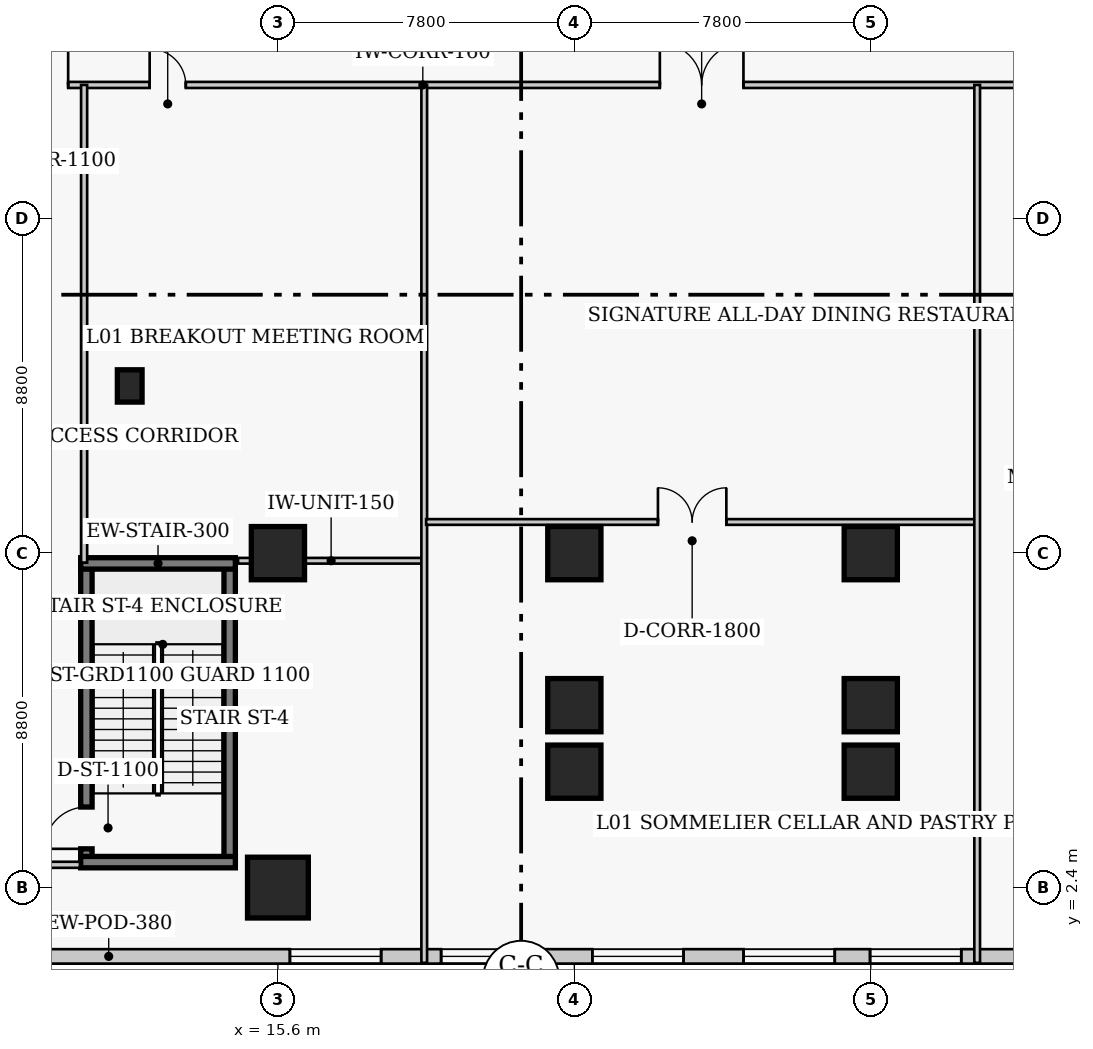
"""IFC4 building model, lengths in metres.
Left out: names, types, materials, properties, quantities, classifications, styles, units other than length and angle.
Written with IfcOpenShell. Run it as: python <this file> out.ifc"""

import sys

from ifc_helpers import new_model, si_unit, direction, frame, frame_2d, origin, origin_2d, place, context, subcontext, project, spatial, rectangle, extrude, element, fill, save


model = new_model("IFC4")
c1 = context("Model", 3, precision=1e-05, world=origin(), true_north=direction((0.0, 1.0)))
c2 = subcontext(c1, "Body", "Model", "MODEL_VIEW")
j1 = project(units=[si_unit("LENGTHUNIT", "METRE"), si_unit("PLANEANGLEUNIT", "RADIAN")], contexts=[c1])
p1 = place(None, origin())
s1 = spatial("IfcSite", under=j1, at=p1, CompositionType="ELEMENT")
p2 = place(p1, origin())
s2 = spatial("IfcBuilding", under=s1, at=p2, CompositionType="ELEMENT")
p3 = place(p2, frame((0.0, 0.0, 5.4)))
s3 = spatial("IfcBuildingStorey", under=s2, at=p3, CompositionType="ELEMENT", Elevation=5.4)
p4 = place(p3, frame((10.56, 3.07, 0.0), z_axis=(0.0, 0.0, 1.0), x_axis=(0.0, 1.0, 0.0)))
e1 = element("IfcWall", 1, at=p4, inside=s3, PredefinedType="SHEAR", context=c2, shape_type="SweptSolid", body=[
    extrude(rectangle(XDim=7.86, YDim=0.3, at=frame_2d((3.93, 0.0))), origin(), (0.0, 0.0, 1.0), 5.0),
])
p5 = place(p4, frame((0.35, 0.0, 0.0)))
e2 = element("IfcOpeningElement", 2, at=p5, cuts=e1, PredefinedType="OPENING", context=c2, shape_type="SweptSolid", body=[
    extrude(rectangle(XDim=1.1, YDim=2.15, at=frame_2d((0.55, 1.075))), frame((0.0, 0.16, 0.0), z_axis=(0.0, -1.0, 0.0), x_axis=(1.0, 0.0, 0.0)), (0.0, 0.0, 1.0), 0.32),
])
p6 = place(p3, frame((14.33, 3.07, 0.0), z_axis=(0.0, 0.0, 1.0), x_axis=(0.0, 1.0, 0.0)))
e3 = element("IfcWall", 3, at=p6, inside=s3, PredefinedType="SHEAR", context=c2, shape_type="SweptSolid", body=[
    extrude(rectangle(XDim=7.86, YDim=0.3, at=frame_2d((3.93, 0.0))), origin(), (0.0, 0.0, 1.0), 5.0),
])
for number, where, z_axis, x_axis in (
    (4, (10.41, 10.93, 0.0), (0.0, 0.0, 1.0), (1.0, 0.0, 0.0)),
    (5, (10.41, 3.07, 0.0), (0.0, 0.0, 1.0), (1.0, 0.0, 0.0)),
):
    element("IfcWall", number, at=place(p3, frame(where, z_axis=z_axis, x_axis=x_axis)), inside=s3, PredefinedType="SHEAR", context=c2, shape_type="SweptSolid", body=[
        extrude(rectangle(XDim=4.07, YDim=0.3, at=frame_2d((2.035, 0.0))), origin(), (0.0, 0.0, 1.0), 5.0),
    ])
p7 = place(p3, frame((15.6, 2.4, 0.0), z_axis=(0.0, 0.0, 1.0), x_axis=(1.0, 0.0, 0.0)))
e6 = element("IfcColumn", 6, at=p7, inside=s3, PredefinedType="COLUMN", context=c2, shape_type="SweptSolid", body=[
    extrude(rectangle(XDim=1.6, YDim=1.6, at=origin_2d()), origin(), (0.0, 0.0, 1.0), 5.0),
])
for number, where, z_axis, x_axis in (
    (7, (15.6, 11.2, 0.0), (0.0, 0.0, 1.0), (1.0, 0.0, 0.0)),
    (8, (23.4, 11.2, 0.0), (0.0, 0.0, 1.0), (1.0, 0.0, 0.0)),
    (9, (31.2, 11.2, 0.0), (0.0, 0.0, 1.0), (1.0, 0.0, 0.0)),
    (10, (23.4, 7.2, 0.0), (0.0, 0.0, 1.0), (1.0, 0.0, 0.0)),
    (11, (31.2, 7.2, 0.0), (0.0, 0.0, 1.0), (1.0, 0.0, 0.0)),
    (12, (23.4, 5.45, 0.0), (0.0, 0.0, 1.0), (1.0, 0.0, 0.0)),
    (13, (31.2, 5.45, 0.0), (0.0, 0.0, 1.0), (1.0, 0.0, 0.0)),
):
    element("IfcColumn", number, at=place(p3, frame(where, z_axis=z_axis, x_axis=x_axis)), inside=s3, PredefinedType="COLUMN", context=c2, shape_type="SweptSolid", body=[
        extrude(rectangle(XDim=1.4, YDim=1.4, at=origin_2d()), origin(), (0.0, 0.0, 1.0), 5.0),
    ])
p8 = place(p3, frame((11.7, 15.6, 0.0), z_axis=(0.0, 0.0, 1.0), x_axis=(1.0, 0.0, 0.0)))
e14 = element("IfcColumn", 14, at=p8, inside=s3, PredefinedType="PILASTER", context=c2, shape_type="SweptSolid", body=[
    extrude(rectangle(XDim=0.65, YDim=0.85, at=origin_2d()), origin(), (0.0, 0.0, 1.0), 5.0),
])
p9 = place(p3, frame((-0.79, 0.59, 0.0), z_axis=(0.0, 0.0, 1.0), x_axis=(1.0, 0.0, 0.0)))
e15 = element("IfcWall", 15, at=p9, inside=s3, PredefinedType="SOLIDWALL", context=c2, shape_type="SweptSolid", body=[
    extrude(rectangle(XDim=79.58, YDim=0.38, at=frame_2d((39.79, 0.0))), origin(), (0.0, 0.0, 1.0), 4.65),
])
p10 = place(p9, frame((1.439, 0.0, 0.75)))
e16 = element("IfcOpeningElement", 16, at=p10, cuts=e15, PredefinedType="OPENING", context=c2, shape_type="SweptSolid", body=[
    extrude(rectangle(XDim=2.4, YDim=2.2, at=frame_2d((1.2, 1.1))), frame((0.0, 0.2, 0.0), z_axis=(0.0, -1.0, 0.0), x_axis=(1.0, 0.0, 0.0)), (0.0, 0.0, 1.0), 0.4),
])
p11 = place(p9, frame((4.769, 0.0, 0.75)))
e17 = element("IfcOpeningElement", 17, at=p11, cuts=e15, PredefinedType="OPENING", context=c2, shape_type="SweptSolid", body=[
    extrude(rectangle(XDim=2.4, YDim=2.2, at=frame_2d((1.2, 1.1))), frame((0.0, 0.2, 0.0), z_axis=(0.0, -1.0, 0.0), x_axis=(1.0, 0.0, 0.0)), (0.0, 0.0, 1.0), 0.4),
])
p12 = place(p9, frame((16.706, 0.0, 0.75)))
e18 = element("IfcOpeningElement", 18, at=p12, cuts=e15, PredefinedType="OPENING", context=c2, shape_type="SweptSolid", body=[
    extrude(rectangle(XDim=2.4, YDim=2.2, at=frame_2d((1.2, 1.1))), frame((0.0, 0.2, 0.0), z_axis=(0.0, -1.0, 0.0), x_axis=(1.0, 0.0, 0.0)), (0.0, 0.0, 1.0), 0.4),
])
p13 = place(p9, frame((20.685, 0.0, 0.75)))
e19 = element("IfcOpeningElement", 19, at=p13, cuts=e15, PredefinedType="OPENING", context=c2, shape_type="SweptSolid", body=[
    extrude(rectangle(XDim=2.4, YDim=2.2, at=frame_2d((1.2, 1.1))), frame((0.0, 0.2, 0.0), z_axis=(0.0, -1.0, 0.0), x_axis=(1.0, 0.0, 0.0)), (0.0, 0.0, 1.0), 0.4),
])
p14 = place(p9, frame((24.664, 0.0, 0.75)))
e20 = element("IfcOpeningElement", 20, at=p14, cuts=e15, PredefinedType="OPENING", context=c2, shape_type="SweptSolid", body=[
    extrude(rectangle(XDim=2.4, YDim=2.2, at=frame_2d((1.2, 1.1))), frame((0.0, 0.2, 0.0), z_axis=(0.0, -1.0, 0.0), x_axis=(1.0, 0.0, 0.0)), (0.0, 0.0, 1.0), 0.4),
])
p15 = place(p9, frame((28.643, 0.0, 0.75)))
e21 = element("IfcOpeningElement", 21, at=p15, cuts=e15, PredefinedType="OPENING", context=c2, shape_type="SweptSolid", body=[
    extrude(rectangle(XDim=2.4, YDim=2.2, at=frame_2d((1.2, 1.1))), frame((0.0, 0.2, 0.0), z_axis=(0.0, -1.0, 0.0), x_axis=(1.0, 0.0, 0.0)), (0.0, 0.0, 1.0), 0.4),
])
p16 = place(p9, frame((31.971, 0.0, 0.75)))
e22 = element("IfcOpeningElement", 22, at=p16, cuts=e15, PredefinedType="OPENING", context=c2, shape_type="SweptSolid", body=[
    extrude(rectangle(XDim=2.4, YDim=2.2, at=frame_2d((1.2, 1.1))), frame((0.0, 0.2, 0.0), z_axis=(0.0, -1.0, 0.0), x_axis=(1.0, 0.0, 0.0)), (0.0, 0.0, 1.0), 0.4),
])
p17 = place(p9, frame((37.75, 0.0, 0.75)))
e23 = element("IfcOpeningElement", 23, at=p17, cuts=e15, PredefinedType="OPENING", context=c2, shape_type="SweptSolid", body=[
    extrude(rectangle(XDim=2.4, YDim=2.2, at=frame_2d((1.2, 1.1))), frame((0.0, 0.2, 0.0), z_axis=(0.0, -1.0, 0.0), x_axis=(1.0, 0.0, 0.0)), (0.0, 0.0, 1.0), 0.4),
])
p18 = place(p9, frame((44.559, 0.0, 0.75)))
e24 = element("IfcOpeningElement", 24, at=p18, cuts=e15, PredefinedType="OPENING", context=c2, shape_type="SweptSolid", body=[
    extrude(rectangle(XDim=2.4, YDim=2.2, at=frame_2d((1.2, 1.1))), frame((0.0, 0.2, 0.0), z_axis=(0.0, -1.0, 0.0), x_axis=(1.0, 0.0, 0.0)), (0.0, 0.0, 1.0), 0.4),
])
p19 = place(p9, frame((49.188, 0.0, 0.75)))
e25 = element("IfcOpeningElement", 25, at=p19, cuts=e15, PredefinedType="OPENING", context=c2, shape_type="SweptSolid", body=[
    extrude(rectangle(XDim=2.4, YDim=2.2, at=frame_2d((1.2, 1.1))), frame((0.0, 0.2, 0.0), z_axis=(0.0, -1.0, 0.0), x_axis=(1.0, 0.0, 0.0)), (0.0, 0.0, 1.0), 0.4),
])
p20 = place(p9, frame((52.517, 0.0, 0.75)))
e26 = element("IfcOpeningElement", 26, at=p20, cuts=e15, PredefinedType="OPENING", context=c2, shape_type="SweptSolid", body=[
    extrude(rectangle(XDim=2.4, YDim=2.2, at=frame_2d((1.2, 1.1))), frame((0.0, 0.2, 0.0), z_axis=(0.0, -1.0, 0.0), x_axis=(1.0, 0.0, 0.0)), (0.0, 0.0, 1.0), 0.4),
])
p21 = place(p9, frame((56.496, 0.0, 0.75)))
e27 = element("IfcOpeningElement", 27, at=p21, cuts=e15, PredefinedType="OPENING", context=c2, shape_type="SweptSolid", body=[
    extrude(rectangle(XDim=2.4, YDim=2.2, at=frame_2d((1.2, 1.1))), frame((0.0, 0.2, 0.0), z_axis=(0.0, -1.0, 0.0), x_axis=(1.0, 0.0, 0.0)), (0.0, 0.0, 1.0), 0.4),
])
p22 = place(p9, frame((60.475, 0.0, 0.75)))
e28 = element("IfcOpeningElement", 28, at=p22, cuts=e15, PredefinedType="OPENING", context=c2, shape_type="SweptSolid", body=[
    extrude(rectangle(XDim=2.4, YDim=2.2, at=frame_2d((1.2, 1.1))), frame((0.0, 0.2, 0.0), z_axis=(0.0, -1.0, 0.0), x_axis=(1.0, 0.0, 0.0)), (0.0, 0.0, 1.0), 0.4),
])
p23 = place(p9, frame((64.454, 0.0, 0.75)))
e29 = element("IfcOpeningElement", 29, at=p23, cuts=e15, PredefinedType="OPENING", context=c2, shape_type="SweptSolid", body=[
    extrude(rectangle(XDim=2.4, YDim=2.2, at=frame_2d((1.2, 1.1))), frame((0.0, 0.2, 0.0), z_axis=(0.0, -1.0, 0.0), x_axis=(1.0, 0.0, 0.0)), (0.0, 0.0, 1.0), 0.4),
])
p24 = place(p9, frame((68.433, 0.0, 0.75)))
e30 = element("IfcOpeningElement", 30, at=p24, cuts=e15, PredefinedType="OPENING", context=c2, shape_type="SweptSolid", body=[
    extrude(rectangle(XDim=2.4, YDim=2.2, at=frame_2d((1.2, 1.1))), frame((0.0, 0.2, 0.0), z_axis=(0.0, -1.0, 0.0), x_axis=(1.0, 0.0, 0.0)), (0.0, 0.0, 1.0), 0.4),
])
p25 = place(p9, frame((72.412, 0.0, 0.75)))
e31 = element("IfcOpeningElement", 31, at=p25, cuts=e15, PredefinedType="OPENING", context=c2, shape_type="SweptSolid", body=[
    extrude(rectangle(XDim=2.4, YDim=2.2, at=frame_2d((1.2, 1.1))), frame((0.0, 0.2, 0.0), z_axis=(0.0, -1.0, 0.0), x_axis=(1.0, 0.0, 0.0)), (0.0, 0.0, 1.0), 0.4),
])
p26 = place(p9, frame((75.74, 0.0, 0.75)))
e32 = element("IfcOpeningElement", 32, at=p26, cuts=e15, PredefinedType="OPENING", context=c2, shape_type="SweptSolid", body=[
    extrude(rectangle(XDim=2.4, YDim=2.2, at=frame_2d((1.2, 1.1))), frame((0.0, 0.2, 0.0), z_axis=(0.0, -1.0, 0.0), x_axis=(1.0, 0.0, 0.0)), (0.0, 0.0, 1.0), 0.4),
])
p27 = place(p3, frame((-2.98, 23.52, 0.0), z_axis=(0.0, 0.0, 1.0), x_axis=(1.0, 0.0, 0.0)))
e33 = element("IfcWall", 33, at=p27, inside=s3, PredefinedType="PARTITIONING", context=c2, shape_type="SweptSolid", body=[
    extrude(rectangle(XDim=83.96, YDim=0.16, at=frame_2d((41.98, 0.0))), origin(), (0.0, 0.0, 1.0), 4.65),
])
p28 = place(p27, frame((7.13, 0.0, 0.0)))
e34 = element("IfcOpeningElement", 34, at=p28, cuts=e33, PredefinedType="OPENING", context=c2, shape_type="SweptSolid", body=[
    extrude(rectangle(XDim=1.0, YDim=2.15, at=frame_2d((0.5, 1.075))), frame((0.0, 0.09, 0.0), z_axis=(0.0, -1.0, 0.0), x_axis=(1.0, 0.0, 0.0)), (0.0, 0.0, 1.0), 0.18),
])
p29 = place(p27, frame((11.96, 0.0, 0.0)))
e35 = element("IfcOpeningElement", 35, at=p29, cuts=e33, PredefinedType="OPENING", context=c2, shape_type="SweptSolid", body=[
    extrude(rectangle(XDim=1.1, YDim=2.15, at=frame_2d((0.55, 1.075))), frame((0.0, 0.09, 0.0), z_axis=(0.0, -1.0, 0.0), x_axis=(1.0, 0.0, 0.0)), (0.0, 0.0, 1.0), 0.18),
])
p30 = place(p27, frame((15.205, 0.0, 0.0)))
e36 = element("IfcOpeningElement", 36, at=p30, cuts=e33, PredefinedType="OPENING", context=c2, shape_type="SweptSolid", body=[
    extrude(rectangle(XDim=0.95, YDim=2.1, at=frame_2d((0.475, 1.05))), frame((0.0, 0.09, 0.0), z_axis=(0.0, -1.0, 0.0), x_axis=(1.0, 0.0, 0.0)), (0.0, 0.0, 1.0), 0.18),
])
p31 = place(p27, frame((28.63, 0.0, 0.0)))
e37 = element("IfcOpeningElement", 37, at=p31, cuts=e33, PredefinedType="OPENING", context=c2, shape_type="SweptSolid", body=[
    extrude(rectangle(XDim=2.2, YDim=2.4, at=frame_2d((1.1, 1.2))), frame((0.0, 0.09, 0.0), z_axis=(0.0, -1.0, 0.0), x_axis=(1.0, 0.0, 0.0)), (0.0, 0.0, 1.0), 0.18),
])
p32 = place(p27, frame((42.88, 0.0, 0.0)))
e38 = element("IfcOpeningElement", 38, at=p32, cuts=e33, PredefinedType="OPENING", context=c2, shape_type="SweptSolid", body=[
    extrude(rectangle(XDim=2.2, YDim=2.4, at=frame_2d((1.1, 1.2))), frame((0.0, 0.09, 0.0), z_axis=(0.0, -1.0, 0.0), x_axis=(1.0, 0.0, 0.0)), (0.0, 0.0, 1.0), 0.18),
])
p33 = place(p27, frame((57.08, 0.0, 0.0)))
e39 = element("IfcOpeningElement", 39, at=p33, cuts=e33, PredefinedType="OPENING", context=c2, shape_type="SweptSolid", body=[
    extrude(rectangle(XDim=2.2, YDim=2.4, at=frame_2d((1.1, 1.2))), frame((0.0, 0.09, 0.0), z_axis=(0.0, -1.0, 0.0), x_axis=(1.0, 0.0, 0.0)), (0.0, 0.0, 1.0), 0.18),
])
p34 = place(p27, frame((67.34, 0.0, 0.0)))
e40 = element("IfcOpeningElement", 40, at=p34, cuts=e33, PredefinedType="OPENING", context=c2, shape_type="SweptSolid", body=[
    extrude(rectangle(XDim=0.88, YDim=2.05, at=frame_2d((0.44, 1.025))), frame((0.0, 0.09, 0.0), z_axis=(0.0, -1.0, 0.0), x_axis=(1.0, 0.0, 0.0)), (0.0, 0.0, 1.0), 0.18),
])
p35 = place(p27, frame((76.29, 0.0, 0.0)))
e41 = element("IfcOpeningElement", 41, at=p35, cuts=e33, PredefinedType="OPENING", context=c2, shape_type="SweptSolid", body=[
    extrude(rectangle(XDim=0.88, YDim=2.05, at=frame_2d((0.44, 1.025))), frame((0.0, 0.09, 0.0), z_axis=(0.0, -1.0, 0.0), x_axis=(1.0, 0.0, 0.0)), (0.0, 0.0, 1.0), 0.18),
])
p36 = place(p3, frame((10.5, 10.95, 0.0), z_axis=(0.0, 0.0, 1.0), x_axis=(0.0, 1.0, 0.0)))
e42 = element("IfcWall", 42, at=p36, inside=s3, PredefinedType="PARTITIONING", context=c2, shape_type="SweptSolid", body=[
    extrude(rectangle(XDim=12.57, YDim=0.16, at=frame_2d((6.285, 0.0))), origin(), (0.0, 0.0, 1.0), 4.65),
])
p37 = place(p3, frame((8.6, 3.0, 0.0), z_axis=(0.0, 0.0, 1.0), x_axis=(1.0, 0.0, 0.0)))
e43 = element("IfcWall", 43, at=p37, inside=s3, PredefinedType="PARTITIONING", context=c2, shape_type="SweptSolid", body=[
    extrude(rectangle(XDim=1.79, YDim=0.16, at=frame_2d((0.895, 0.0))), origin(), (0.0, 0.0, 1.0), 4.65),
])
p38 = place(p3, frame((14.55, 11.0, 0.0), z_axis=(0.0, 0.0, 1.0), x_axis=(1.0, 0.0, 0.0)))
e44 = element("IfcWall", 44, at=p38, inside=s3, PredefinedType="PARTITIONING", context=c2, shape_type="SweptSolid", body=[
    extrude(rectangle(XDim=4.9, YDim=0.15, at=frame_2d((2.45, 0.0))), origin(), (0.0, 0.0, 1.0), 3.61),
])
p39 = place(p3, frame((19.45, 0.42, 0.0), z_axis=(0.0, 0.0, 1.0), x_axis=(0.0, 1.0, 0.0)))
e45 = element("IfcWall", 45, at=p39, inside=s3, PredefinedType="PARTITIONING", context=c2, shape_type="SweptSolid", body=[
    extrude(rectangle(XDim=23.1, YDim=0.15, at=frame_2d((11.55, 0.0))), origin(), (0.0, 0.0, 1.0), 4.65),
])
p40 = place(p3, frame((19.5, 12.02, 0.0), z_axis=(0.0, 0.0, 1.0), x_axis=(1.0, 0.0, 0.0)))
e46 = element("IfcWall", 46, at=p40, inside=s3, PredefinedType="PARTITIONING", context=c2, shape_type="SweptSolid", body=[
    extrude(rectangle(XDim=14.5, YDim=0.15, at=frame_2d((7.25, 0.0))), origin(), (0.0, 0.0, 1.0), 4.65),
])
p41 = place(p40, frame((6.1, 0.0, 0.0)))
e47 = element("IfcOpeningElement", 47, at=p41, cuts=e46, PredefinedType="OPENING", context=c2, shape_type="SweptSolid", body=[
    extrude(rectangle(XDim=1.8, YDim=2.2, at=frame_2d((0.9, 1.1))), frame((0.0, 0.085, 0.0), z_axis=(0.0, -1.0, 0.0), x_axis=(1.0, 0.0, 0.0)), (0.0, 0.0, 1.0), 0.17),
])
p42 = place(p3, frame((34.0, 0.42, 0.0), z_axis=(0.0, 0.0, 1.0), x_axis=(0.0, 1.0, 0.0)))
e48 = element("IfcWall", 48, at=p42, inside=s3, PredefinedType="PARTITIONING", context=c2, shape_type="SweptSolid", body=[
    extrude(rectangle(XDim=23.1, YDim=0.15, at=frame_2d((11.55, 0.0))), origin(), (0.0, 0.0, 1.0), 4.65),
])
p43 = place(p12, origin())
e49 = element("IfcWindow", 49, at=p43, inside=s3, PartitioningType="SINGLE_PANEL", PredefinedType="WINDOW", context=c2, shape_type="SweptSolid", body=[
    extrude(rectangle(XDim=2.4, YDim=2.2, at=frame_2d((1.2, 1.1))), frame((0.0, 0.03, 0.0), z_axis=(0.0, -1.0, 0.0), x_axis=(1.0, 0.0, 0.0)), (0.0, 0.0, 1.0), 0.06),
])
fill(e18, e49)
p44 = place(p13, origin())
e50 = element("IfcWindow", 50, at=p44, inside=s3, PartitioningType="SINGLE_PANEL", PredefinedType="WINDOW", context=c2, shape_type="SweptSolid", body=[
    extrude(rectangle(XDim=2.4, YDim=2.2, at=frame_2d((1.2, 1.1))), frame((0.0, 0.03, 0.0), z_axis=(0.0, -1.0, 0.0), x_axis=(1.0, 0.0, 0.0)), (0.0, 0.0, 1.0), 0.06),
])
fill(e19, e50)
p45 = place(p14, origin())
e51 = element("IfcWindow", 51, at=p45, inside=s3, PartitioningType="SINGLE_PANEL", PredefinedType="WINDOW", context=c2, shape_type="SweptSolid", body=[
    extrude(rectangle(XDim=2.4, YDim=2.2, at=frame_2d((1.2, 1.1))), frame((0.0, 0.03, 0.0), z_axis=(0.0, -1.0, 0.0), x_axis=(1.0, 0.0, 0.0)), (0.0, 0.0, 1.0), 0.06),
])
fill(e20, e51)
p46 = place(p15, origin())
e52 = element("IfcWindow", 52, at=p46, inside=s3, PartitioningType="SINGLE_PANEL", PredefinedType="WINDOW", context=c2, shape_type="SweptSolid", body=[
    extrude(rectangle(XDim=2.4, YDim=2.2, at=frame_2d((1.2, 1.1))), frame((0.0, 0.03, 0.0), z_axis=(0.0, -1.0, 0.0), x_axis=(1.0, 0.0, 0.0)), (0.0, 0.0, 1.0), 0.06),
])
fill(e21, e52)
p47 = place(p16, origin())
e53 = element("IfcWindow", 53, at=p47, inside=s3, PartitioningType="SINGLE_PANEL", PredefinedType="WINDOW", context=c2, shape_type="SweptSolid", body=[
    extrude(rectangle(XDim=2.4, YDim=2.2, at=frame_2d((1.2, 1.1))), frame((0.0, 0.03, 0.0), z_axis=(0.0, -1.0, 0.0), x_axis=(1.0, 0.0, 0.0)), (0.0, 0.0, 1.0), 0.06),
])
fill(e22, e53)
p48 = place(p29, origin())
e54 = element("IfcDoor", 54, at=p48, inside=s3, OperationType="SINGLE_SWING_RIGHT", PredefinedType="DOOR", context=c2, shape_type="SweptSolid", body=[
    extrude(rectangle(XDim=1.1, YDim=2.15, at=frame_2d((0.55, 1.075))), frame((0.0, 0.025, 0.0), z_axis=(0.0, -1.0, 0.0), x_axis=(1.0, 0.0, 0.0)), (0.0, 0.0, 1.0), 0.05),
])
fill(e35, e54)
p49 = place(p30, origin())
e55 = element("IfcDoor", 55, at=p49, inside=s3, OperationType="SINGLE_SWING_LEFT", PredefinedType="DOOR", context=c2, shape_type="SweptSolid", body=[
    extrude(rectangle(XDim=0.95, YDim=2.1, at=frame_2d((0.475, 1.05))), frame((0.0, 0.025, 0.0), z_axis=(0.0, -1.0, 0.0), x_axis=(1.0, 0.0, 0.0)), (0.0, 0.0, 1.0), 0.05),
])
fill(e36, e55)
p50 = place(p41, origin())
e56 = element("IfcDoor", 56, at=p50, inside=s3, OperationType="DOUBLE_DOOR_SINGLE_SWING", PredefinedType="DOOR", context=c2, shape_type="SweptSolid", body=[
    extrude(rectangle(XDim=1.8, YDim=2.2, at=frame_2d((0.9, 1.1))), frame((0.0, 0.025, 0.0), z_axis=(0.0, -1.0, 0.0), x_axis=(1.0, 0.0, 0.0)), (0.0, 0.0, 1.0), 0.05),
])
fill(e47, e56)
p51 = place(p31, origin())
e57 = element("IfcDoor", 57, at=p51, inside=s3, OperationType="DOUBLE_DOOR_SINGLE_SWING", PredefinedType="DOOR", context=c2, shape_type="SweptSolid", body=[
    extrude(rectangle(XDim=2.2, YDim=2.4, at=frame_2d((1.1, 1.2))), frame((0.0, 0.025, 0.0), z_axis=(0.0, -1.0, 0.0), x_axis=(1.0, 0.0, 0.0)), (0.0, 0.0, 1.0), 0.05),
])
fill(e37, e57)
p52 = place(p5, origin())
e58 = element("IfcDoor", 58, at=p52, inside=s3, OperationType="SINGLE_SWING_LEFT", PredefinedType="DOOR", context=c2, shape_type="SweptSolid", body=[
    extrude(rectangle(XDim=1.1, YDim=2.15, at=frame_2d((0.55, 1.075))), frame((0.0, 0.025, 0.0), z_axis=(0.0, -1.0, 0.0), x_axis=(1.0, 0.0, 0.0)), (0.0, 0.0, 1.0), 0.05),
])
fill(e2, e58)
save(model, sys.argv[1])
